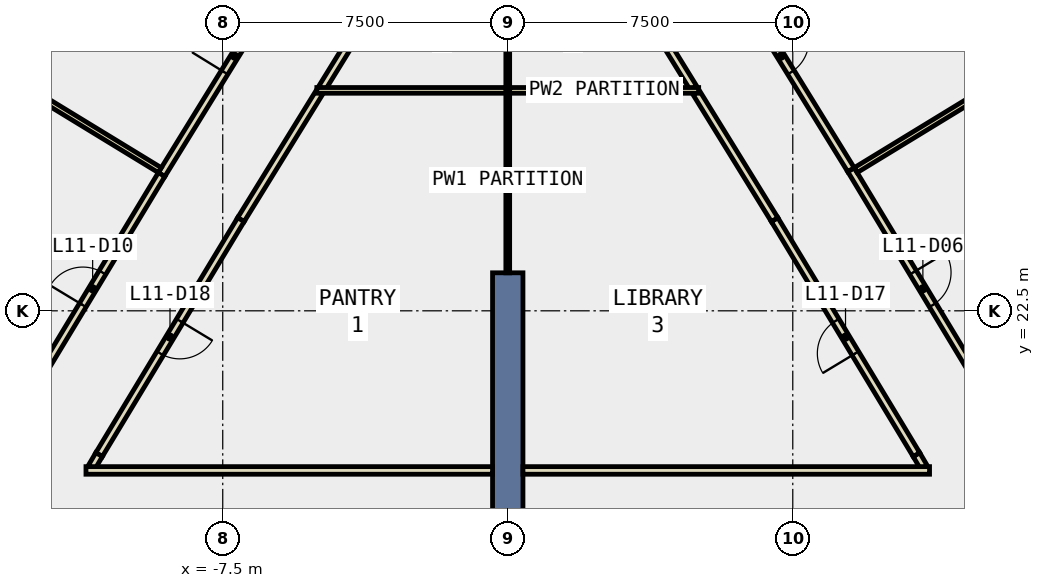
"""IFC4 building model, lengths in metres.
Left out: names, types, materials, properties, quantities, classifications, styles, units other than length and angle.
Written with IfcOpenShell. Run it as: python <this file> out.ifc"""

import sys

from ifc_helpers import new_model, si_unit, direction, frame, frame_2d, origin, place, context, subcontext, project, spatial, rectangle, extrude, element, fill, save


model = new_model("IFC4")
c1 = context("Model", 3, precision=1e-05, world=origin(), true_north=direction((0.0, 1.0)))
c2 = subcontext(c1, "Body", "Model", "MODEL_VIEW")
j1 = project(units=[si_unit("LENGTHUNIT", "METRE"), si_unit("PLANEANGLEUNIT", "RADIAN")], contexts=[c1])
p1 = place(None, origin())
s1 = spatial("IfcSite", under=j1, at=p1, CompositionType="ELEMENT")
p2 = place(p1, origin())
s2 = spatial("IfcBuilding", under=s1, at=p2, CompositionType="ELEMENT")
p3 = place(p2, frame((0.0, 0.0, 56.0)))
s3 = spatial("IfcBuildingStorey", under=s2, at=p3, CompositionType="ELEMENT", Elevation=56.0)
p4 = place(p3, frame((0.0, 14.5, -0.4), z_axis=(0.0, 0.0, 1.0), x_axis=(0.0, 1.0, 0.0)))
e1 = element("IfcWall", 1, at=p4, inside=s3, PredefinedType="SHEAR", context=c2, shape_type="SweptSolid", body=[
    extrude(rectangle(XDim=9.0, YDim=0.8, at=frame_2d((4.5, 0.0))), origin(), (0.0, 0.0, 1.0), 4.2),
])
p5 = place(p3, frame((10.948, 18.386, 0.0), z_axis=(0.0, 0.0, 1.0), x_axis=(-0.506880801681, 0.862016155815, 0.0)))
e2 = element("IfcWall", 2, at=p5, inside=s3, PredefinedType="PARTITIONING", context=c2, shape_type="SweptSolid", body=[
    extrude(rectangle(XDim=0.383, YDim=0.2, at=frame_2d((0.191, 0.0))), origin(), (0.0, 0.0, 1.0), 3.8),
])
p6 = place(p3, frame((10.754, 18.716, 0.0), z_axis=(0.0, 0.0, 1.0), x_axis=(-0.516755973305, 0.856132737403, 0.0)))
e3 = element("IfcWall", 3, at=p6, inside=s3, PredefinedType="PARTITIONING", context=c2, shape_type="SweptSolid", body=[
    extrude(rectangle(XDim=7.222, YDim=0.2, at=frame_2d((3.611, 0.0))), origin(), (0.0, 0.0, 1.0), 3.8),
])
p7 = place(p6, frame((3.111, 0.0, 0.0)))
e4 = element("IfcOpeningElement", 4, at=p7, cuts=e3, PredefinedType="OPENING", context=c2, shape_type="SweptSolid", body=[
    extrude(rectangle(XDim=1.0, YDim=2.1, at=frame_2d((0.5, 1.05))), frame((0.0, 0.11, 0.0), z_axis=(0.0, -1.0, 0.0), x_axis=(1.0, 0.0, 0.0)), (0.0, 0.0, 1.0), 0.22),
])
for number, where, z_axis, x_axis in (
    (5, (7.022, 24.899, 0.0), (0.0, 0.0, 1.0), (-0.525, 0.851, 0.0)),
    (6, (-4.963, 28.236, 0.0), (0.0, 0.0, 1.0), (-0.525, -0.851, 0.0)),
):
    element("IfcWall", number, at=place(p3, frame(where, z_axis=z_axis, x_axis=x_axis)), inside=s3, PredefinedType="PARTITIONING", context=c2, shape_type="SweptSolid", body=[
        extrude(rectangle(XDim=3.921, YDim=0.2, at=frame_2d((1.961, 0.0))), origin(), (0.0, 0.0, 1.0), 3.8),
    ])
p8 = place(p3, frame((-7.022, 24.899, 0.0), z_axis=(0.0, 0.0, 1.0), x_axis=(-0.516755973305, -0.856132737403, 0.0)))
e7 = element("IfcWall", 7, at=p8, inside=s3, PredefinedType="PARTITIONING", context=c2, shape_type="SweptSolid", body=[
    extrude(rectangle(XDim=7.222, YDim=0.2, at=frame_2d((3.611, 0.0))), origin(), (0.0, 0.0, 1.0), 3.8),
])
p9 = place(p8, frame((3.111, 0.0, 0.0)))
e8 = element("IfcOpeningElement", 8, at=p9, cuts=e7, PredefinedType="OPENING", context=c2, shape_type="SweptSolid", body=[
    extrude(rectangle(XDim=1.0, YDim=2.1, at=frame_2d((0.5, 1.05))), frame((0.0, 0.11, 0.0), z_axis=(0.0, -1.0, 0.0), x_axis=(1.0, 0.0, 0.0)), (0.0, 0.0, 1.0), 0.22),
])
p10 = place(p3, frame((-10.754, 18.716, 0.0), z_axis=(0.0, 0.0, 1.0), x_axis=(-0.506880801681, -0.862016155815, 0.0)))
e9 = element("IfcWall", 9, at=p10, inside=s3, PredefinedType="PARTITIONING", context=c2, shape_type="SweptSolid", body=[
    extrude(rectangle(XDim=0.383, YDim=0.2, at=frame_2d((0.191, 0.0))), origin(), (0.0, 0.0, 1.0), 3.8),
])
for number, where, z_axis, x_axis in (
    (10, (4.885, 28.364, 0.0), (0.0, 0.0, 1.0), (-0.525, 0.851, 0.0)),
    (11, (-3.231, 31.045, 0.0), (0.0, 0.0, 1.0), (-0.525, -0.851, 0.0)),
):
    element("IfcWall", number, at=place(p3, frame(where, z_axis=z_axis, x_axis=x_axis)), inside=s3, PredefinedType="PARTITIONING", context=c2, shape_type="SweptSolid", body=[
        extrude(rectangle(XDim=3.15, YDim=0.2, at=frame_2d((1.575, 0.0))), origin(), (0.0, 0.0, 1.0), 3.8),
    ])
p11 = place(p3, frame((9.032, 26.213, 0.0), z_axis=(0.0, 0.0, 1.0), x_axis=(0.516789314756, -0.856112611841, 0.0)))
e12 = element("IfcWall", 12, at=p11, inside=s3, PredefinedType="PARTITIONING", context=c2, shape_type="SweptSolid", body=[
    extrude(rectangle(XDim=7.32, YDim=0.2, at=frame_2d((3.66, 0.0))), origin(), (0.0, 0.0, 1.0), 3.8),
])
p12 = place(p11, frame((3.16, 0.0, 0.0)))
e13 = element("IfcOpeningElement", 13, at=p12, cuts=e12, PredefinedType="OPENING", context=c2, shape_type="SweptSolid", body=[
    extrude(rectangle(XDim=1.0, YDim=2.1, at=frame_2d((0.5, 1.05))), frame((0.0, 0.11, 0.0), z_axis=(0.0, -1.0, 0.0), x_axis=(1.0, 0.0, 0.0)), (0.0, 0.0, 1.0), 0.22),
])
p13 = place(p3, frame((5.267, 32.315, 0.0), z_axis=(0.0, 0.0, 1.0), x_axis=(0.524988204957, -0.851109502153, 0.0)))
e14 = element("IfcWall", 14, at=p13, inside=s3, PredefinedType="PARTITIONING", context=c2, shape_type="SweptSolid", body=[
    extrude(rectangle(XDim=7.169, YDim=0.2, at=frame_2d((3.585, 0.0))), origin(), (0.0, 0.0, 1.0), 3.8),
])
p14 = place(p13, frame((3.16, 0.0, 0.0)))
e15 = element("IfcOpeningElement", 15, at=p14, cuts=e14, PredefinedType="OPENING", context=c2, shape_type="SweptSolid", body=[
    extrude(rectangle(XDim=1.0, YDim=2.1, at=frame_2d((0.5, 1.05))), frame((0.0, 0.11, 0.0), z_axis=(0.0, -1.0, 0.0), x_axis=(1.0, 0.0, 0.0)), (0.0, 0.0, 1.0), 0.22),
])
p15 = place(p3, frame((-9.11, 26.085, 0.0), z_axis=(0.0, 0.0, 1.0), x_axis=(0.525007100846, 0.85109784635, 0.0)))
e16 = element("IfcWall", 16, at=p15, inside=s3, PredefinedType="PARTITIONING", context=c2, shape_type="SweptSolid", body=[
    extrude(rectangle(XDim=7.32, YDim=0.2, at=frame_2d((3.66, 0.0))), origin(), (0.0, 0.0, 1.0), 3.8),
])
p16 = place(p15, frame((3.16, 0.0, 0.0)))
e17 = element("IfcOpeningElement", 17, at=p16, cuts=e16, PredefinedType="OPENING", context=c2, shape_type="SweptSolid", body=[
    extrude(rectangle(XDim=1.0, YDim=2.1, at=frame_2d((0.5, 1.05))), frame((0.0, 0.11, 0.0), z_axis=(0.0, -1.0, 0.0), x_axis=(1.0, 0.0, 0.0)), (0.0, 0.0, 1.0), 0.22),
])
p17 = place(p3, frame((-12.815, 19.946, 0.0), z_axis=(0.0, 0.0, 1.0), x_axis=(0.516822021522, 0.856092867667, 0.0)))
e18 = element("IfcWall", 18, at=p17, inside=s3, PredefinedType="PARTITIONING", context=c2, shape_type="SweptSolid", body=[
    extrude(rectangle(XDim=7.171, YDim=0.2, at=frame_2d((3.585, 0.0))), origin(), (0.0, 0.0, 1.0), 3.8),
])
p18 = place(p17, frame((3.16, 0.0, 0.0)))
e19 = element("IfcOpeningElement", 19, at=p18, cuts=e18, PredefinedType="OPENING", context=c2, shape_type="SweptSolid", body=[
    extrude(rectangle(XDim=1.0, YDim=2.1, at=frame_2d((0.5, 1.05))), frame((0.0, 0.11, 0.0), z_axis=(0.0, -1.0, 0.0), x_axis=(1.0, 0.0, 0.0)), (0.0, 0.0, 1.0), 0.22),
])
for number, where, z_axis, x_axis in (
    (20, (0.4, 18.3, 0.0), (0.0, 0.0, 1.0), (1.0, 0.0, 0.0)),
    (21, (-11.099, 18.3, 0.0), (0.0, 0.0, 1.0), (1.0, 0.0, 0.0)),
):
    element("IfcWall", number, at=place(p3, frame(where, z_axis=z_axis, x_axis=x_axis)), inside=s3, PredefinedType="PARTITIONING", context=c2, shape_type="SweptSolid", body=[
        extrude(rectangle(XDim=10.699, YDim=0.2, at=frame_2d((5.35, 0.0))), origin(), (0.0, 0.0, 1.0), 3.8),
    ])
p19 = place(p3, frame((0.0, 23.5, 0.0), z_axis=(0.0, 0.0, 1.0), x_axis=(0.0, 1.0, 0.0)))
e22 = element("IfcWall", 22, at=p19, inside=s3, PredefinedType="PARTITIONING", context=c2, shape_type="SweptSolid", body=[
    extrude(rectangle(XDim=4.875, YDim=0.1, at=frame_2d((2.438, 0.0))), origin(), (0.0, 0.0, 1.0), 3.8),
])
for number, where, z_axis, x_axis in (
    (23, (0.05, 28.3, 0.0), (0.0, 0.0, 1.0), (1.0, 0.0, 0.0)),
    (24, (-5.024, 28.3, 0.0), (0.0, 0.0, 1.0), (1.0, 0.0, 0.0)),
):
    element("IfcWall", number, at=place(p3, frame(where, z_axis=z_axis, x_axis=x_axis)), inside=s3, PredefinedType="PARTITIONING", context=c2, shape_type="SweptSolid", body=[
        extrude(rectangle(XDim=4.974, YDim=0.15, at=frame_2d((2.487, 0.0))), origin(), (0.0, 0.0, 1.0), 3.8),
    ])
p20 = place(p3, frame((0.0, 28.375, 0.0), z_axis=(0.0, 0.0, 1.0), x_axis=(0.0, 1.0, 0.0)))
e25 = element("IfcWall", 25, at=p20, inside=s3, PredefinedType="PARTITIONING", context=c2, shape_type="SweptSolid", body=[
    extrude(rectangle(XDim=7.895, YDim=0.1, at=frame_2d((3.948, 0.0))), origin(), (0.0, 0.0, 1.0), 3.8),
])
for number, where, z_axis, x_axis in (
    (26, (9.156, 26.201, 0.0), (0.0, 0.0, 1.0), (0.854, 0.521, 0.0)),
    (27, (-9.156, 26.201, 0.0), (0.0, 0.0, 1.0), (-0.854, 0.521, 0.0)),
):
    element("IfcWall", number, at=place(p3, frame(where, z_axis=z_axis, x_axis=x_axis)), inside=s3, PredefinedType="PARTITIONING", context=c2, shape_type="SweptSolid", body=[
        extrude(rectangle(XDim=5.98, YDim=0.15, at=frame_2d((2.99, 0.0))), origin(), (0.0, 0.0, 1.0), 3.8),
    ])
p21 = place(p12, origin())
e28 = element("IfcDoor", 28, at=p21, inside=s3, OperationType="SINGLE_SWING_LEFT", PredefinedType="DOOR", context=c2, shape_type="SweptSolid", body=[
    extrude(rectangle(XDim=1.0, YDim=2.1, at=frame_2d((0.5, 1.05))), frame((0.0, 0.025, 0.0), z_axis=(0.0, -1.0, 0.0), x_axis=(1.0, 0.0, 0.0)), (0.0, 0.0, 1.0), 0.05),
])
fill(e13, e28)
p22 = place(p14, origin())
e29 = element("IfcDoor", 29, at=p22, inside=s3, OperationType="SINGLE_SWING_RIGHT", PredefinedType="DOOR", context=c2, shape_type="SweptSolid", body=[
    extrude(rectangle(XDim=1.0, YDim=2.1, at=frame_2d((0.5, 1.05))), frame((0.0, 0.025, 0.0), z_axis=(0.0, -1.0, 0.0), x_axis=(1.0, 0.0, 0.0)), (0.0, 0.0, 1.0), 0.05),
])
fill(e15, e29)
p23 = place(p16, origin())
e30 = element("IfcDoor", 30, at=p23, inside=s3, OperationType="SINGLE_SWING_RIGHT", PredefinedType="DOOR", context=c2, shape_type="SweptSolid", body=[
    extrude(rectangle(XDim=1.0, YDim=2.1, at=frame_2d((0.5, 1.05))), frame((0.0, 0.025, 0.0), z_axis=(0.0, -1.0, 0.0), x_axis=(1.0, 0.0, 0.0)), (0.0, 0.0, 1.0), 0.05),
])
fill(e17, e30)
p24 = place(p18, origin())
e31 = element("IfcDoor", 31, at=p24, inside=s3, OperationType="SINGLE_SWING_LEFT", PredefinedType="DOOR", context=c2, shape_type="SweptSolid", body=[
    extrude(rectangle(XDim=1.0, YDim=2.1, at=frame_2d((0.5, 1.05))), frame((0.0, 0.025, 0.0), z_axis=(0.0, -1.0, 0.0), x_axis=(1.0, 0.0, 0.0)), (0.0, 0.0, 1.0), 0.05),
])
fill(e19, e31)
p25 = place(p7, origin())
e32 = element("IfcDoor", 32, at=p25, inside=s3, OperationType="SINGLE_SWING_LEFT", PredefinedType="DOOR", context=c2, shape_type="SweptSolid", body=[
    extrude(rectangle(XDim=1.0, YDim=2.1, at=frame_2d((0.5, 1.05))), frame((0.0, 0.025, 0.0), z_axis=(0.0, -1.0, 0.0), x_axis=(1.0, 0.0, 0.0)), (0.0, 0.0, 1.0), 0.05),
])
fill(e4, e32)
p26 = place(p9, origin())
e33 = element("IfcDoor", 33, at=p26, inside=s3, OperationType="SINGLE_SWING_LEFT", PredefinedType="DOOR", context=c2, shape_type="SweptSolid", body=[
    extrude(rectangle(XDim=1.0, YDim=2.1, at=frame_2d((0.5, 1.05))), frame((0.0, 0.025, 0.0), z_axis=(0.0, -1.0, 0.0), x_axis=(1.0, 0.0, 0.0)), (0.0, 0.0, 1.0), 0.05),
])
fill(e8, e33)
save(model, sys.argv[1])
